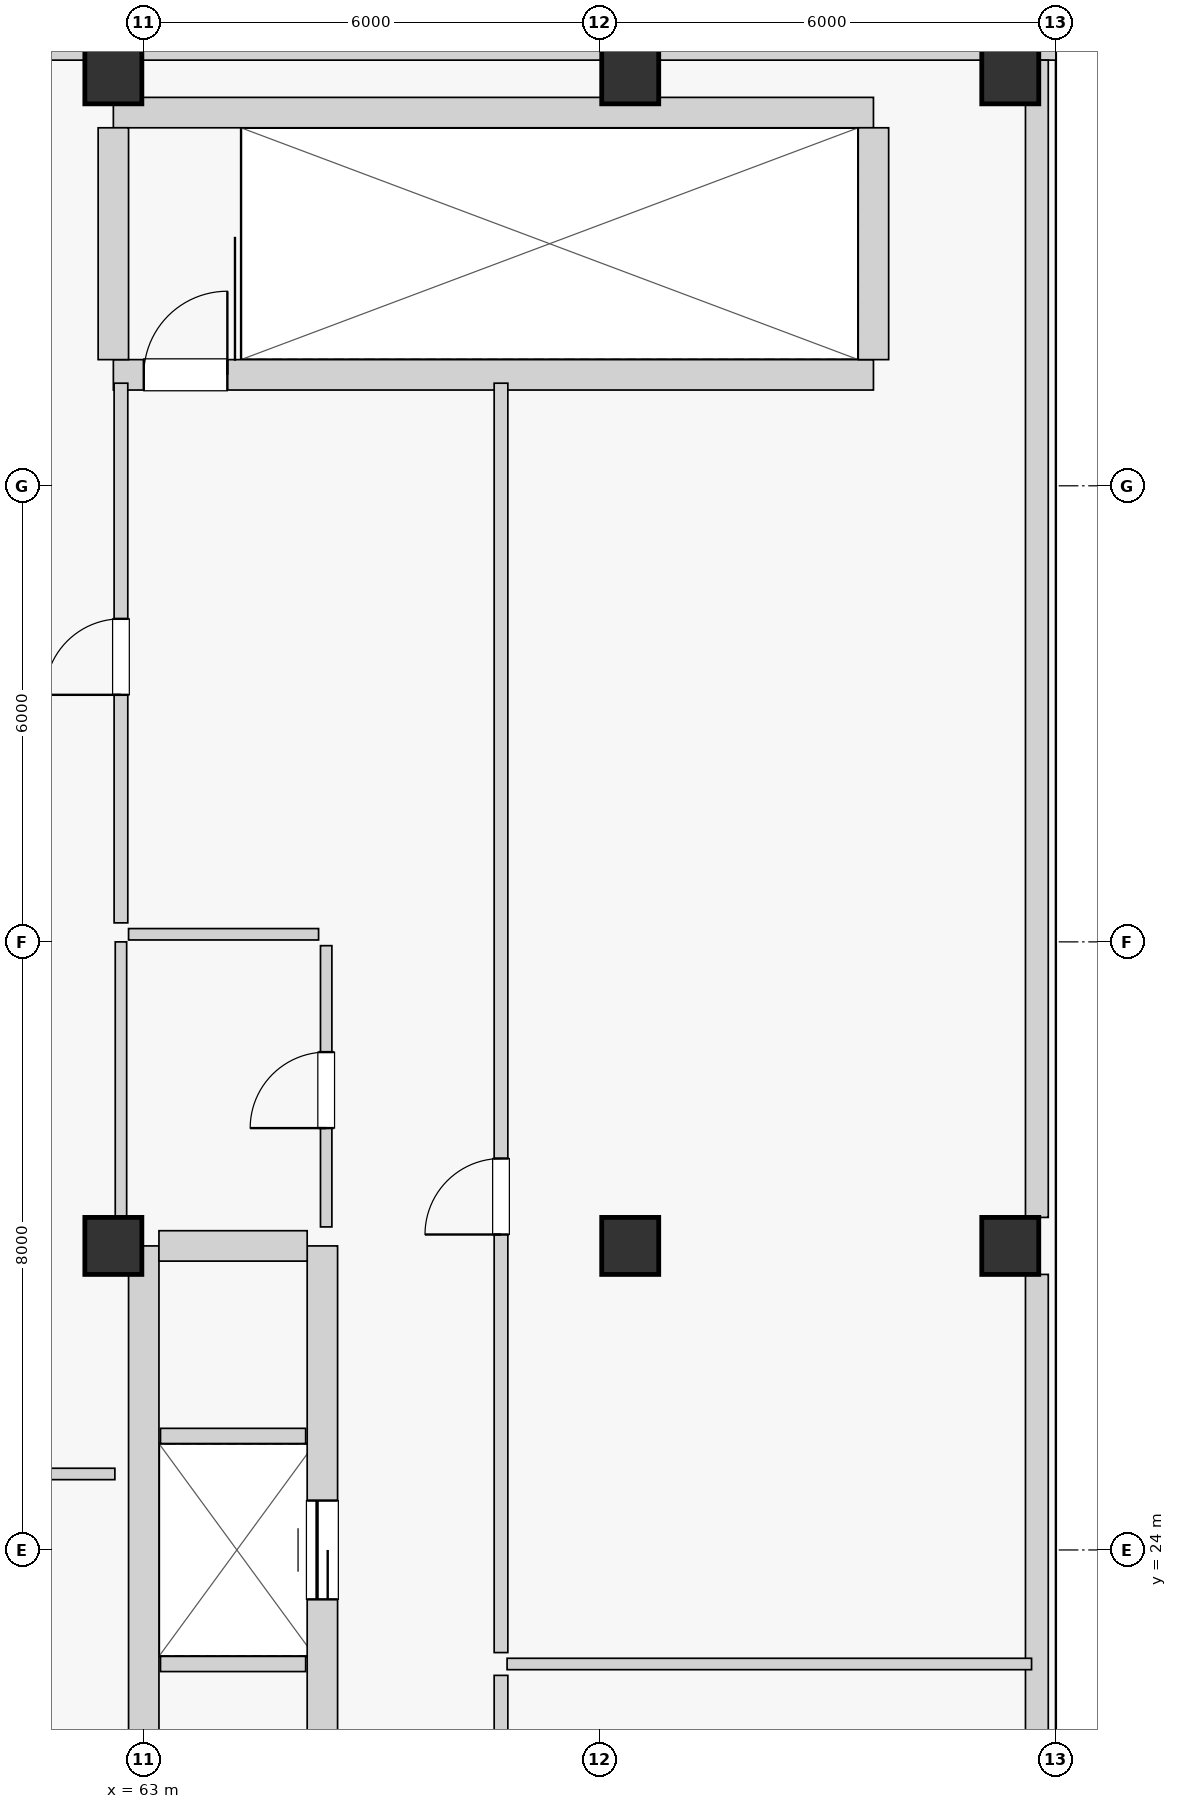
"""IFC4 building model, lengths in metres.
Left out: names, types, materials, properties, quantities, classifications, styles, units other than length and angle.
Written with IfcOpenShell. Run it as: python <this file> out.ifc"""

import sys

from ifc_helpers import new_model, si_unit, direction, frame, frame_2d, origin, origin_2d, place, context, subcontext, project, spatial, rectangle, extrude, source, transform, mapped, element, fill, save


model = new_model("IFC4")
c1 = context("Model", 3, precision=1e-05, world=origin(), true_north=direction((0.0, 1.0)))
c2 = subcontext(c1, "Body", "Model", "MODEL_VIEW")
j1 = project(units=[si_unit("LENGTHUNIT", "METRE"), si_unit("PLANEANGLEUNIT", "RADIAN")], contexts=[c1])
p1 = place(None, origin())
s1 = spatial("IfcSite", under=j1, at=p1, CompositionType="ELEMENT")
p2 = place(p1, origin())
s2 = spatial("IfcBuilding", under=s1, at=p2, CompositionType="ELEMENT")
p3 = place(p2, frame((0.0, 0.0, 18.4)))
s3 = spatial("IfcBuildingStorey", under=s2, at=p3, CompositionType="ELEMENT", Elevation=18.4)
for number, where, z_axis, x_axis in (
    (1, (62.6, 28.0, 0.0), (0.0, 0.0, 1.0), (1.0, 0.0, 0.0)),
    (2, (62.6, 43.4, 0.0), (0.0, 0.0, 1.0), (1.0, 0.0, 0.0)),
    (3, (69.4, 28.0, 0.0), (0.0, 0.0, 1.0), (1.0, 0.0, 0.0)),
    (4, (69.4, 43.4, 0.0), (0.0, 0.0, 1.0), (1.0, 0.0, 0.0)),
    (5, (74.4, 28.0, 0.0), (0.0, 0.0, 1.0), (1.0, 0.0, 0.0)),
    (6, (74.4, 43.4, 0.0), (0.0, 0.0, 1.0), (1.0, 0.0, 0.0)),
):
    element("IfcColumn", number, at=place(p3, frame(where, z_axis=z_axis, x_axis=x_axis)), inside=s3, PredefinedType="COLUMN", context=c2, shape_type="SweptSolid", body=[
        extrude(rectangle(XDim=0.75, YDim=0.75, at=origin_2d()), origin(), (0.0, 0.0, 1.0), 4.4),
    ])
p4 = place(p3, frame((75.0, 43.75, 0.0), z_axis=(0.0, 0.0, 1.0), x_axis=(-1.0, 0.0, 0.0)))
e7 = element("IfcWall", 7, at=p4, inside=s3, PredefinedType="SOLIDWALL", context=c2, shape_type="SweptSolid", body=[
    extrude(rectangle(XDim=5.225, YDim=0.3, at=frame_2d((2.613, 0.0))), origin(), (0.0, 0.0, 1.0), 3.39),
])
p5 = place(p4, frame((2.2, 0.0, 0.85)))
e8 = element("IfcOpeningElement", 8, at=p5, cuts=e7, PredefinedType="OPENING", context=c2, shape_type="SweptSolid", body=[
    extrude(rectangle(XDim=1.8, YDim=1.65, at=frame_2d((0.9, 0.825))), frame((0.0, 0.16, 0.0), z_axis=(0.0, -1.0, 0.0), x_axis=(1.0, 0.0, 0.0)), (0.0, 0.0, 1.0), 0.32),
])
p6 = place(p3, frame((69.025, 43.75, 0.0), z_axis=(0.0, 0.0, 1.0), x_axis=(-1.0, 0.0, 0.0)))
e9 = element("IfcWall", 9, at=p6, inside=s3, PredefinedType="SOLIDWALL", context=c2, shape_type="SweptSolid", body=[
    extrude(rectangle(XDim=6.05, YDim=0.3, at=frame_2d((3.025, 0.0))), origin(), (0.0, 0.0, 1.0), 3.39),
])
p7 = place(p6, frame((2.125, 0.0, 0.85)))
e10 = element("IfcOpeningElement", 10, at=p7, cuts=e9, PredefinedType="OPENING", context=c2, shape_type="SweptSolid", body=[
    extrude(rectangle(XDim=1.8, YDim=1.65, at=frame_2d((0.9, 0.825))), frame((0.0, 0.16, 0.0), z_axis=(0.0, -1.0, 0.0), x_axis=(1.0, 0.0, 0.0)), (0.0, 0.0, 1.0), 0.32),
])
p8 = place(p3, frame((62.225, 43.75, 0.0), z_axis=(0.0, 0.0, 1.0), x_axis=(-1.0, 0.0, 0.0)))
e11 = element("IfcWall", 11, at=p8, inside=s3, PredefinedType="SOLIDWALL", context=c2, shape_type="SweptSolid", body=[
    extrude(rectangle(XDim=5.225, YDim=0.3, at=frame_2d((2.613, 0.0))), origin(), (0.0, 0.0, 1.0), 3.39),
])
p9 = place(p8, frame((1.225, 0.0, 0.85)))
e12 = element("IfcOpeningElement", 12, at=p9, cuts=e11, PredefinedType="OPENING", context=c2, shape_type="SweptSolid", body=[
    extrude(rectangle(XDim=1.8, YDim=1.65, at=frame_2d((0.9, 0.825))), frame((0.0, 0.16, 0.0), z_axis=(0.0, -1.0, 0.0), x_axis=(1.0, 0.0, 0.0)), (0.0, 0.0, 1.0), 0.32),
])
p10 = place(p3, frame((74.75, 16.375, 0.0), z_axis=(0.0, 0.0, 1.0), x_axis=(0.0, 1.0, 0.0)))
e13 = element("IfcWall", 13, at=p10, inside=s3, PredefinedType="SOLIDWALL", context=c2, shape_type="SweptSolid", body=[
    extrude(rectangle(XDim=11.25, YDim=0.3, at=frame_2d((5.625, 0.0))), origin(), (0.0, 0.0, 1.0), 3.39),
])
p11 = place(p10, frame((5.025, 0.0, 0.95)))
e14 = element("IfcOpeningElement", 14, at=p11, cuts=e13, PredefinedType="OPENING", context=c2, shape_type="SweptSolid", body=[
    extrude(rectangle(XDim=1.2, YDim=1.5, at=frame_2d((0.6, 0.75))), frame((0.0, 0.16, 0.0), z_axis=(0.0, -1.0, 0.0), x_axis=(1.0, 0.0, 0.0)), (0.0, 0.0, 1.0), 0.32),
])
p12 = place(p3, frame((74.75, 28.375, 0.0), z_axis=(0.0, 0.0, 1.0), x_axis=(0.0, 1.0, 0.0)))
e15 = element("IfcWall", 15, at=p12, inside=s3, PredefinedType="SOLIDWALL", context=c2, shape_type="SweptSolid", body=[
    extrude(rectangle(XDim=15.225, YDim=0.3, at=frame_2d((7.613, 0.0))), origin(), (0.0, 0.0, 1.0), 3.39),
])
p13 = place(p12, frame((6.725, 0.0, 0.95)))
e16 = element("IfcOpeningElement", 16, at=p13, cuts=e15, PredefinedType="OPENING", context=c2, shape_type="SweptSolid", body=[
    extrude(rectangle(XDim=1.2, YDim=1.5, at=frame_2d((0.6, 0.75))), frame((0.0, 0.16, 0.0), z_axis=(0.0, -1.0, 0.0), x_axis=(1.0, 0.0, 0.0)), (0.0, 0.0, 1.0), 0.32),
])
p14 = place(p3, frame((63.0, 16.0, 0.0), z_axis=(0.0, 0.0, 1.0), x_axis=(0.0, 1.0, 0.0)))
e17 = element("IfcWall", 17, at=p14, inside=s3, PredefinedType="SHEAR", context=c2, shape_type="SweptSolid", body=[
    extrude(rectangle(XDim=12.0, YDim=0.4, at=frame_2d((6.0, 0.0))), origin(), (0.0, 0.0, 1.0), 4.14),
])
p15 = place(p3, frame((65.35, 16.0, 0.0), z_axis=(0.0, 0.0, 1.0), x_axis=(0.0, 1.0, 0.0)))
e18 = element("IfcWall", 18, at=p15, inside=s3, PredefinedType="SHEAR", context=c2, shape_type="SweptSolid", body=[
    extrude(rectangle(XDim=12.0, YDim=0.4, at=frame_2d((6.0, 0.0))), origin(), (0.0, 0.0, 1.0), 4.14),
])
p16 = place(p15, frame((3.35, 0.0, 0.0)))
e19 = element("IfcOpeningElement", 19, at=p16, cuts=e18, PredefinedType="OPENING", context=c2, shape_type="SweptSolid", body=[
    extrude(rectangle(XDim=1.3, YDim=2.25, at=frame_2d((0.65, 1.125))), frame((0.0, 0.21, 0.0), z_axis=(0.0, -1.0, 0.0), x_axis=(1.0, 0.0, 0.0)), (0.0, 0.0, 1.0), 0.42),
])
p17 = place(p15, frame((7.35, 0.0, 0.0)))
e20 = element("IfcOpeningElement", 20, at=p17, cuts=e18, PredefinedType="OPENING", context=c2, shape_type="SweptSolid", body=[
    extrude(rectangle(XDim=1.3, YDim=2.25, at=frame_2d((0.65, 1.125))), frame((0.0, 0.21, 0.0), z_axis=(0.0, -1.0, 0.0), x_axis=(1.0, 0.0, 0.0)), (0.0, 0.0, 1.0), 0.42),
])
p18 = place(p3, frame((63.2, 28.0, 0.0), z_axis=(0.0, 0.0, 1.0), x_axis=(1.0, 0.0, 0.0)))
e21 = element("IfcWall", 21, at=p18, inside=s3, PredefinedType="SHEAR", context=c2, shape_type="SweptSolid", body=[
    extrude(rectangle(XDim=1.95, YDim=0.4, at=frame_2d((0.975, 0.0))), origin(), (0.0, 0.0, 1.0), 4.14),
])
for number, where, z_axis, x_axis in (
    (22, (63.22, 22.5, 0.0), (0.0, 0.0, 1.0), (1.0, 0.0, 0.0)),
    (23, (63.22, 25.5, 0.0), (0.0, 0.0, 1.0), (1.0, 0.0, 0.0)),
):
    element("IfcWall", number, at=place(p3, frame(where, z_axis=z_axis, x_axis=x_axis)), inside=s3, PredefinedType="SOLIDWALL", context=c2, shape_type="SweptSolid", body=[
        extrude(rectangle(XDim=1.91, YDim=0.2, at=frame_2d((0.955, 0.0))), origin(), (0.0, 0.0, 1.0), 4.14),
    ])
p19 = place(p3, frame((62.6, 39.46, 0.0), z_axis=(0.0, 0.0, 1.0), x_axis=(1.0, 0.0, 0.0)))
e24 = element("IfcWall", 24, at=p19, inside=s3, PredefinedType="SHEAR", context=c2, shape_type="SweptSolid", body=[
    extrude(rectangle(XDim=10.0, YDim=0.4, at=frame_2d((5.0, 0.0))), origin(), (0.0, 0.0, 1.0), 4.14),
])
p20 = place(p19, frame((0.4, 0.0, 0.0)))
e25 = element("IfcOpeningElement", 25, at=p20, cuts=e24, PredefinedType="OPENING", context=c2, shape_type="SweptSolid", body=[
    extrude(rectangle(XDim=1.1, YDim=2.03, at=frame_2d((0.55, 1.015))), frame((0.0, 0.21, 0.0), z_axis=(0.0, -1.0, 0.0), x_axis=(1.0, 0.0, 0.0)), (0.0, 0.0, 1.0), 0.42),
])
p21 = place(p3, frame((62.6, 42.91, 0.0), z_axis=(0.0, 0.0, 1.0), x_axis=(1.0, 0.0, 0.0)))
e26 = element("IfcWall", 26, at=p21, inside=s3, PredefinedType="SHEAR", context=c2, shape_type="SweptSolid", body=[
    extrude(rectangle(XDim=10.0, YDim=0.4, at=frame_2d((5.0, 0.0))), origin(), (0.0, 0.0, 1.0), 4.14),
])
for number, where, z_axis, x_axis in (
    (27, (62.6, 39.66, 0.0), (0.0, 0.0, 1.0), (0.0, 1.0, 0.0)),
    (28, (72.6, 39.66, 0.0), (0.0, 0.0, 1.0), (0.0, 1.0, 0.0)),
):
    element("IfcWall", number, at=place(p3, frame(where, z_axis=z_axis, x_axis=x_axis)), inside=s3, PredefinedType="SHEAR", context=c2, shape_type="SweptSolid", body=[
        extrude(rectangle(XDim=3.05, YDim=0.4, at=frame_2d((1.525, 0.0))), origin(), (0.0, 0.0, 1.0), 4.14),
    ])
p22 = place(p3, frame((62.8, 32.1, 0.0), z_axis=(0.0, 0.0, 1.0), x_axis=(1.0, 0.0, 0.0)))
e29 = element("IfcWall", 29, at=p22, inside=s3, PredefinedType="PARTITIONING", context=c2, shape_type="SweptSolid", body=[
    extrude(rectangle(XDim=2.5, YDim=0.15, at=frame_2d((1.25, 0.0))), origin(), (0.0, 0.0, 1.0), 4.14),
])
p23 = place(p3, frame((62.7, 28.2, 0.0), z_axis=(0.0, 0.0, 1.0), x_axis=(0.0, 1.0, 0.0)))
e30 = element("IfcWall", 30, at=p23, inside=s3, PredefinedType="PARTITIONING", context=c2, shape_type="SweptSolid", body=[
    extrude(rectangle(XDim=3.8, YDim=0.15, at=frame_2d((1.9, 0.0))), origin(), (0.0, 0.0, 1.0), 3.54),
])
p24 = place(p3, frame((65.4, 28.25, 0.0), z_axis=(0.0, 0.0, 1.0), x_axis=(0.0, 1.0, 0.0)))
e31 = element("IfcWall", 31, at=p24, inside=s3, PredefinedType="PARTITIONING", context=c2, shape_type="SweptSolid", body=[
    extrude(rectangle(XDim=3.7, YDim=0.15, at=frame_2d((1.85, 0.0))), origin(), (0.0, 0.0, 1.0), 4.14),
])
p25 = place(p24, frame((1.3, 0.0, 0.0)))
e32 = element("IfcOpeningElement", 32, at=p25, cuts=e31, PredefinedType="OPENING", context=c2, shape_type="SweptSolid", body=[
    extrude(rectangle(XDim=1.0, YDim=2.01, at=frame_2d((0.5, 1.005))), frame((0.0, 0.085, 0.0), z_axis=(0.0, -1.0, 0.0), x_axis=(1.0, 0.0, 0.0)), (0.0, 0.0, 1.0), 0.17),
])
p26 = place(p3, frame((62.7, 32.25, 0.0), z_axis=(0.0, 0.0, 1.0), x_axis=(0.0, 1.0, 0.0)))
e33 = element("IfcWall", 33, at=p26, inside=s3, PredefinedType="PARTITIONING", context=c2, shape_type="SweptSolid", body=[
    extrude(rectangle(XDim=7.1, YDim=0.18, at=frame_2d((3.55, 0.0))), origin(), (0.0, 0.0, 1.0), 3.54),
])
p27 = place(p26, frame((3.0, 0.0, 0.0)))
e34 = element("IfcOpeningElement", 34, at=p27, cuts=e33, PredefinedType="OPENING", context=c2, shape_type="SweptSolid", body=[
    extrude(rectangle(XDim=1.0, YDim=2.01, at=frame_2d((0.5, 1.005))), frame((0.0, 0.1, 0.0), z_axis=(0.0, -1.0, 0.0), x_axis=(1.0, 0.0, 0.0)), (0.0, 0.0, 1.0), 0.2),
])
p28 = place(p3, frame((57.32, 25.0, 0.0), z_axis=(0.0, 0.0, 1.0), x_axis=(1.0, 0.0, 0.0)))
e35 = element("IfcWall", 35, at=p28, inside=s3, PredefinedType="PARTITIONING", context=c2, shape_type="SweptSolid", body=[
    extrude(rectangle(XDim=5.3, YDim=0.15, at=frame_2d((2.65, 0.0))), origin(), (0.0, 0.0, 1.0), 4.14),
])
p29 = place(p3, frame((67.7, 8.65, 0.0), z_axis=(0.0, 0.0, 1.0), x_axis=(0.0, 1.0, 0.0)))
e36 = element("IfcWall", 36, at=p29, inside=s3, PredefinedType="PARTITIONING", context=c2, shape_type="SweptSolid", body=[
    extrude(rectangle(XDim=13.7, YDim=0.18, at=frame_2d((6.85, 0.0))), origin(), (0.0, 0.0, 1.0), 4.14),
])
p30 = place(p29, frame((5.5, 0.0, 0.0)))
e37 = element("IfcOpeningElement", 37, at=p30, cuts=e36, PredefinedType="OPENING", context=c2, shape_type="SweptSolid", body=[
    extrude(rectangle(XDim=1.0, YDim=2.01, at=frame_2d((0.5, 1.005))), frame((0.0, 0.1, 0.0), z_axis=(0.0, -1.0, 0.0), x_axis=(1.0, 0.0, 0.0)), (0.0, 0.0, 1.0), 0.2),
])
p31 = place(p3, frame((67.7, 22.65, 0.0), z_axis=(0.0, 0.0, 1.0), x_axis=(0.0, 1.0, 0.0)))
e38 = element("IfcWall", 38, at=p31, inside=s3, PredefinedType="PARTITIONING", context=c2, shape_type="SweptSolid", body=[
    extrude(rectangle(XDim=16.7, YDim=0.18, at=frame_2d((8.35, 0.0))), origin(), (0.0, 0.0, 1.0), 4.14),
])
p32 = place(p31, frame((5.5, 0.0, 0.0)))
e39 = element("IfcOpeningElement", 39, at=p32, cuts=e38, PredefinedType="OPENING", context=c2, shape_type="SweptSolid", body=[
    extrude(rectangle(XDim=1.0, YDim=2.01, at=frame_2d((0.5, 1.005))), frame((0.0, 0.1, 0.0), z_axis=(0.0, -1.0, 0.0), x_axis=(1.0, 0.0, 0.0)), (0.0, 0.0, 1.0), 0.2),
])
p33 = place(p3, frame((67.78, 22.5, 0.0), z_axis=(0.0, 0.0, 1.0), x_axis=(1.0, 0.0, 0.0)))
e40 = element("IfcWall", 40, at=p33, inside=s3, PredefinedType="PARTITIONING", context=c2, shape_type="SweptSolid", body=[
    extrude(rectangle(XDim=6.9, YDim=0.15, at=frame_2d((3.45, 0.0))), origin(), (0.0, 0.0, 1.0), 4.14),
])
m1 = source(origin(), c2, "Body", "SweptSolid", [
    extrude(rectangle(XDim=1.2, YDim=1.5, at=frame_2d((0.6, 0.75))), frame((0.0, 0.03, 0.0), z_axis=(0.0, -1.0, 0.0), x_axis=(1.0, 0.0, 0.0)), (0.0, 0.0, 1.0), 0.06),
])
p34 = place(p11, origin())
e41 = element("IfcWindow", 41, at=p34, inside=s3, PartitioningType="SINGLE_PANEL", PredefinedType="WINDOW", context=c2, shape_type="MappedRepresentation", body=[
    mapped(m1, transform((0.0, 0.0, 0.0), scale=1.0)),
])
fill(e14, e41)
p35 = place(p13, origin())
e42 = element("IfcWindow", 42, at=p35, inside=s3, PartitioningType="SINGLE_PANEL", PredefinedType="WINDOW", context=c2, shape_type="MappedRepresentation", body=[
    mapped(m1, transform((0.0, 0.0, 0.0), scale=1.0)),
])
fill(e16, e42)
m2 = source(origin(), c2, "Body", "SweptSolid", [
    extrude(rectangle(XDim=1.3, YDim=2.25, at=frame_2d((0.65, 1.125))), frame((0.0, 0.025, 0.0), z_axis=(0.0, -1.0, 0.0), x_axis=(1.0, 0.0, 0.0)), (0.0, 0.0, 1.0), 0.05),
])
p36 = place(p17, origin())
e43 = element("IfcDoor", 43, at=p36, inside=s3, OperationType="SLIDING_TO_LEFT", PredefinedType="DOOR", context=c2, shape_type="MappedRepresentation", body=[
    mapped(m2, transform((0.0, 0.0, 0.0), scale=1.0)),
])
fill(e20, e43)
m3 = source(origin(), c2, "Body", "SweptSolid", [
    extrude(rectangle(XDim=1.1, YDim=2.03, at=frame_2d((0.55, 1.015))), frame((0.0, 0.025, 0.0), z_axis=(0.0, -1.0, 0.0), x_axis=(1.0, 0.0, 0.0)), (0.0, 0.0, 1.0), 0.05),
])
p37 = place(p20, origin())
e44 = element("IfcDoor", 44, at=p37, inside=s3, OperationType="SINGLE_SWING_RIGHT", PredefinedType="DOOR", context=c2, shape_type="MappedRepresentation", body=[
    mapped(m3, transform((0.0, 0.0, 0.0), scale=1.0)),
])
fill(e25, e44)
m4 = source(origin(), c2, "Body", "SweptSolid", [
    extrude(rectangle(XDim=1.0, YDim=2.01, at=frame_2d((0.5, 1.005))), frame((0.0, 0.025, 0.0), z_axis=(0.0, -1.0, 0.0), x_axis=(1.0, 0.0, 0.0)), (0.0, 0.0, 1.0), 0.05),
])
p38 = place(p25, origin())
e45 = element("IfcDoor", 45, at=p38, inside=s3, OperationType="SINGLE_SWING_LEFT", PredefinedType="DOOR", context=c2, shape_type="MappedRepresentation", body=[
    mapped(m4, transform((0.0, 0.0, 0.0), scale=1.0)),
])
fill(e32, e45)
p39 = place(p27, origin())
e46 = element("IfcDoor", 46, at=p39, inside=s3, OperationType="SINGLE_SWING_LEFT", PredefinedType="DOOR", context=c2, shape_type="MappedRepresentation", body=[
    mapped(m4, transform((0.0, 0.0, 0.0), scale=1.0)),
])
fill(e34, e46)
p40 = place(p32, origin())
e47 = element("IfcDoor", 47, at=p40, inside=s3, OperationType="SINGLE_SWING_LEFT", PredefinedType="DOOR", context=c2, shape_type="MappedRepresentation", body=[
    mapped(m4, transform((0.0, 0.0, 0.0), scale=1.0)),
])
fill(e39, e47)
save(model, sys.argv[1])
